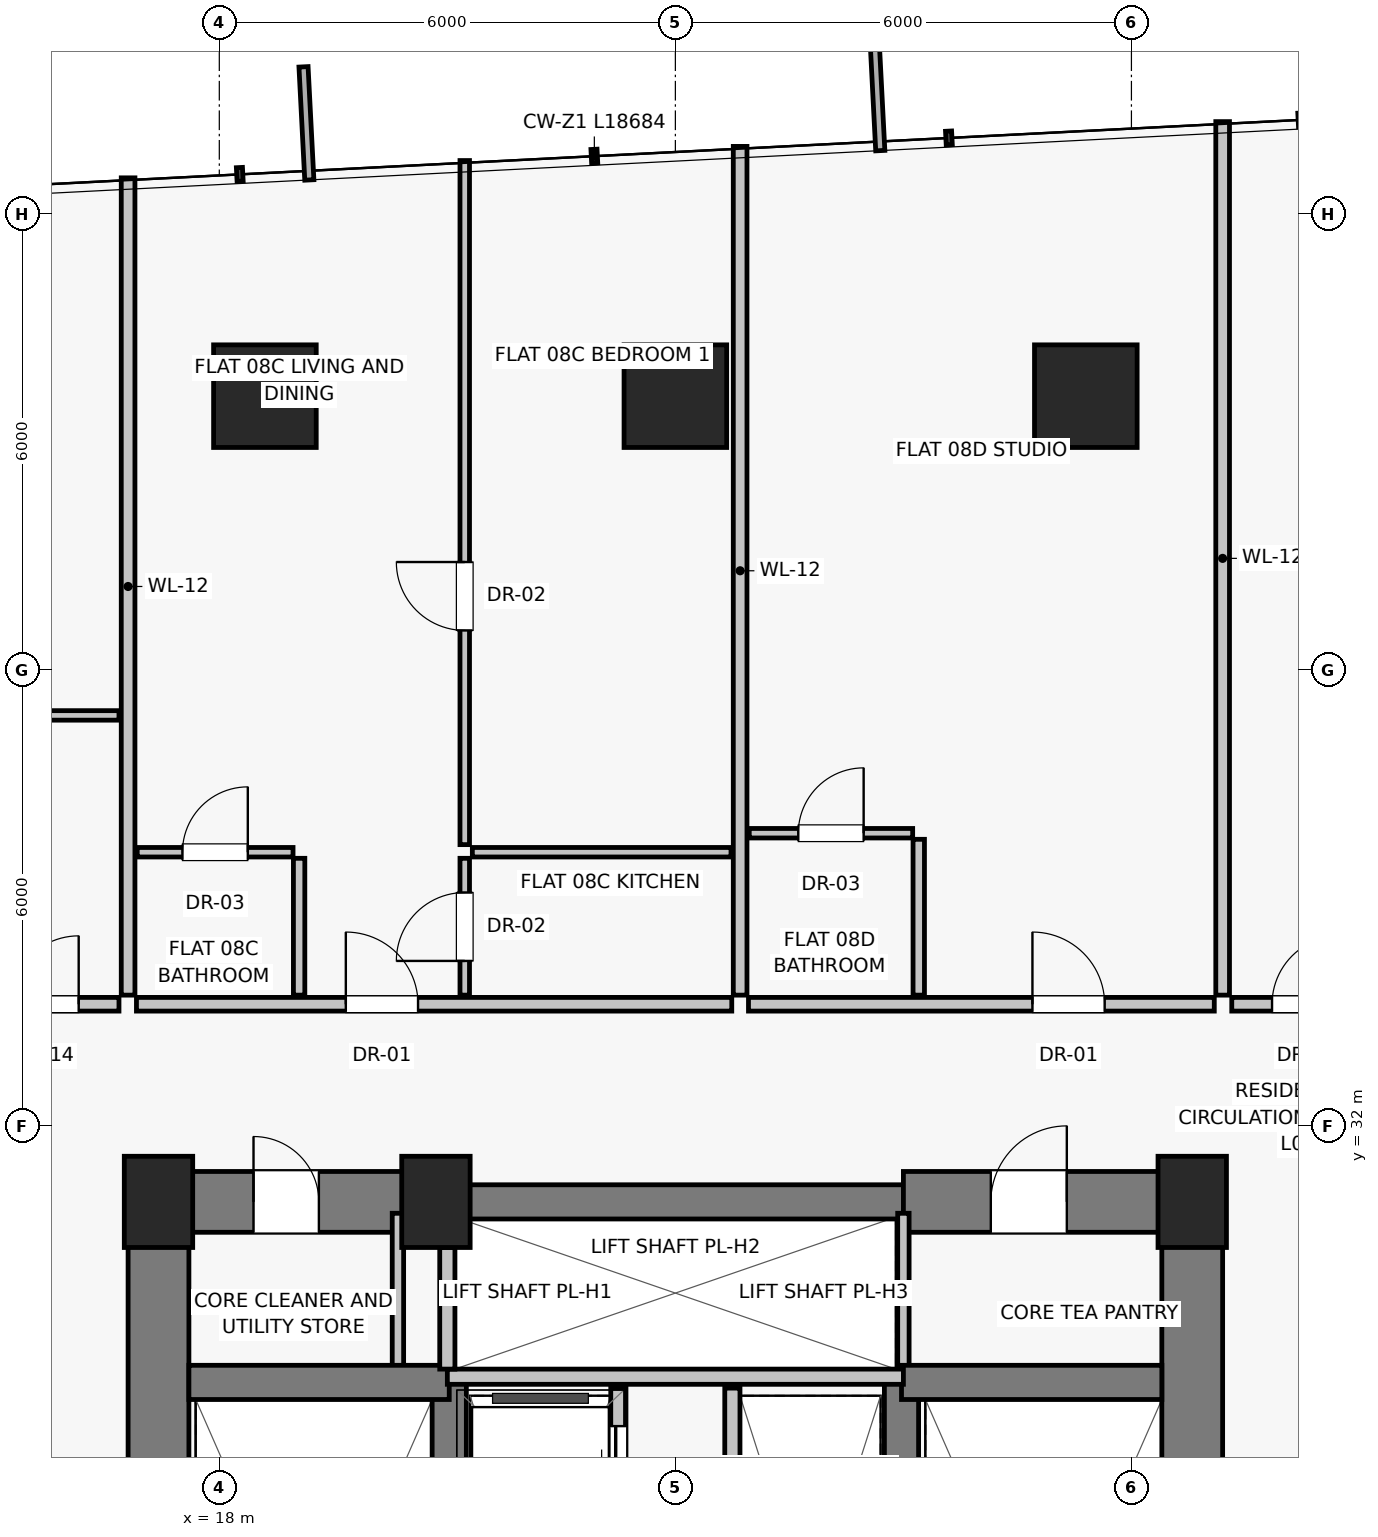
"""IFC4 building model, lengths in metres.
Left out: names, types, materials, properties, quantities, classifications, styles, units other than length and angle.
Written with IfcOpenShell. Run it as: python <this file> out.ifc"""

import sys

from ifc_helpers import new_model, si_unit, direction, frame, frame_2d, origin, origin_2d, place, context, subcontext, project, spatial, rectangle, extrude, source, transform, mapped, element, fill, save


model = new_model("IFC4")
c1 = context("Model", 3, precision=1e-05, world=origin(), true_north=direction((0.0, 1.0)))
c2 = subcontext(c1, "Body", "Model", "MODEL_VIEW")
j1 = project(units=[si_unit("LENGTHUNIT", "METRE"), si_unit("PLANEANGLEUNIT", "RADIAN")], contexts=[c1])
p1 = place(None, origin())
s1 = spatial("IfcSite", under=j1, at=p1, CompositionType="ELEMENT")
p2 = place(p1, origin())
s2 = spatial("IfcBuilding", under=s1, at=p2, CompositionType="ELEMENT")
p3 = place(p2, frame((0.0, 0.0, 33.8)))
s3 = spatial("IfcBuildingStorey", under=s2, at=p3, CompositionType="ELEMENT", Elevation=33.8)
for number, where, z_axis, x_axis in (
    (1, (17.2, 31.0, 0.0), (0.0, 0.0, 1.0), (1.0, 0.0, 0.0)),
    (2, (20.85, 31.0, 0.0), (0.0, 0.0, 1.0), (1.0, 0.0, 0.0)),
    (3, (30.8, 31.0, 0.0), (0.0, 0.0, 1.0), (1.0, 0.0, 0.0)),
):
    element("IfcColumn", number, at=place(p3, frame(where, z_axis=z_axis, x_axis=x_axis)), inside=s3, PredefinedType="PILASTER", context=c2, shape_type="SweptSolid", body=[
        extrude(rectangle(XDim=0.9, YDim=1.2, at=origin_2d()), origin(), (0.0, 0.0, 1.0), 3.25),
    ])
for number, where, z_axis, x_axis in (
    (4, (29.4, 41.6, 0.0), (0.0, 0.0, 1.0), (1.0, 0.0, 0.0)),
    (5, (24.0, 41.6, 0.0), (0.0, 0.0, 1.0), (1.0, 0.0, 0.0)),
    (6, (18.6, 41.6, 0.0), (0.0, 0.0, 1.0), (1.0, 0.0, 0.0)),
):
    element("IfcColumn", number, at=place(p3, frame(where, z_axis=z_axis, x_axis=x_axis)), inside=s3, PredefinedType="COLUMN", context=c2, shape_type="SweptSolid", body=[
        extrude(rectangle(XDim=1.35, YDim=1.35, at=origin_2d()), origin(), (0.0, 0.0, 1.0), 3.25),
    ])
for number, where, z_axis, x_axis in (
    (7, (17.2, 16.8, 0.0), (0.0, 0.0, 1.0), (0.0, 1.0, 0.0)),
    (8, (30.8, 16.8, 0.0), (0.0, 0.0, 1.0), (0.0, 1.0, 0.0)),
):
    element("IfcWall", number, at=place(p3, frame(where, z_axis=z_axis, x_axis=x_axis)), inside=s3, PredefinedType="SHEAR", context=c2, shape_type="SweptSolid", body=[
        extrude(rectangle(XDim=14.2, YDim=0.8, at=frame_2d((7.1, 0.0))), origin(), (0.0, 0.0, 1.0), 3.0),
    ])
p4 = place(p3, frame((17.2, 31.0, 0.0), z_axis=(0.0, 0.0, 1.0), x_axis=(1.0, 0.0, 0.0)))
e9 = element("IfcWall", 9, at=p4, inside=s3, PredefinedType="SHEAR", context=c2, shape_type="SweptSolid", body=[
    extrude(rectangle(XDim=3.8, YDim=0.8, at=frame_2d((1.9, 0.0))), origin(), (0.0, 0.0, 1.0), 3.0),
])
p5 = place(p4, frame((1.25, 0.0, 0.0)))
e10 = element("IfcOpeningElement", 10, at=p5, cuts=e9, PredefinedType="OPENING", context=c2, shape_type="SweptSolid", body=[
    extrude(rectangle(XDim=0.86, YDim=2.01, at=frame_2d((0.43, 1.005))), frame((0.0, 0.41, 0.0), z_axis=(0.0, -1.0, 0.0), x_axis=(1.0, 0.0, 0.0)), (0.0, 0.0, 1.0), 0.82),
])
p6 = place(p3, frame((21.0, 31.0, 0.0), z_axis=(0.0, 0.0, 1.0), x_axis=(1.0, 0.0, 0.0)))
e11 = element("IfcWall", 11, at=p6, inside=s3, PredefinedType="SHEAR", context=c2, shape_type="SweptSolid", body=[
    extrude(rectangle(XDim=6.0, YDim=0.45, at=frame_2d((3.0, 0.0))), origin(), (0.0, 0.0, 1.0), 3.0),
])
p7 = place(p3, frame((27.0, 31.0, 0.0), z_axis=(0.0, 0.0, 1.0), x_axis=(1.0, 0.0, 0.0)))
e12 = element("IfcWall", 12, at=p7, inside=s3, PredefinedType="SHEAR", context=c2, shape_type="SweptSolid", body=[
    extrude(rectangle(XDim=3.8, YDim=0.8, at=frame_2d((1.9, 0.0))), origin(), (0.0, 0.0, 1.0), 3.0),
])
p8 = place(p7, frame((1.15, 0.0, 0.0)))
e13 = element("IfcOpeningElement", 13, at=p8, cuts=e12, PredefinedType="OPENING", context=c2, shape_type="SweptSolid", body=[
    extrude(rectangle(XDim=1.0, YDim=2.01, at=frame_2d((0.5, 1.005))), frame((0.0, 0.41, 0.0), z_axis=(0.0, -1.0, 0.0), x_axis=(1.0, 0.0, 0.0)), (0.0, 0.0, 1.0), 0.82),
])
for number, where, z_axis, x_axis in (
    (14, (20.35, 28.65, 0.0), (0.0, 0.0, 1.0), (0.0, 1.0, 0.0)),
    (15, (27.0, 28.65, 0.0), (0.0, 0.0, 1.0), (0.0, 1.0, 0.0)),
):
    element("IfcWall", number, at=place(p3, frame(where, z_axis=z_axis, x_axis=x_axis)), inside=s3, PredefinedType="PARTITIONING", context=c2, shape_type="SweptSolid", body=[
        extrude(rectangle(XDim=2.2, YDim=0.15, at=frame_2d((1.1, 0.0))), origin(), (0.0, 0.0, 1.0), 3.0),
    ])
for number, where, z_axis, x_axis in (
    (16, (21.025, 19.8, 0.0), (0.0, 0.0, 1.0), (0.0, 1.0, 0.0)),
    (17, (26.975, 19.8, 0.0), (0.0, 0.0, 1.0), (0.0, 1.0, 0.0)),
):
    element("IfcWall", number, at=place(p3, frame(where, z_axis=z_axis, x_axis=x_axis)), inside=s3, PredefinedType="SHEAR", context=c2, shape_type="SweptSolid", body=[
        extrude(rectangle(XDim=8.825, YDim=0.45, at=frame_2d((4.413, 0.0))), origin(), (0.0, 0.0, 1.0), 3.0),
    ])
for number, where, z_axis, x_axis in (
    (18, (17.6, 28.625, 0.0), (0.0, 0.0, 1.0), (1.0, 0.0, 0.0)),
    (19, (26.975, 28.625, 0.0), (0.0, 0.0, 1.0), (1.0, 0.0, 0.0)),
):
    element("IfcWall", number, at=place(p3, frame(where, z_axis=z_axis, x_axis=x_axis)), inside=s3, PredefinedType="SHEAR", context=c2, shape_type="SweptSolid", body=[
        extrude(rectangle(XDim=3.425, YDim=0.45, at=frame_2d((1.712, 0.0))), origin(), (0.0, 0.0, 1.0), 3.0),
    ])
p9 = place(p3, frame((21.0, 28.7, 0.0), z_axis=(0.0, 0.0, 1.0), x_axis=(1.0, 0.0, 0.0)))
e20 = element("IfcWall", 20, at=p9, inside=s3, PredefinedType="SOLIDWALL", context=c2, shape_type="SweptSolid", body=[
    extrude(rectangle(XDim=6.0, YDim=0.2, at=frame_2d((3.0, 0.0))), origin(), (0.0, 0.0, 1.0), 3.0),
])
p10 = place(p3, frame((21.0, 28.8, 0.0), z_axis=(0.0, 0.0, 1.0), x_axis=(0.0, 1.0, 0.0)))
e21 = element("IfcWall", 21, at=p10, inside=s3, PredefinedType="SOLIDWALL", context=c2, shape_type="SweptSolid", body=[
    extrude(rectangle(XDim=1.6, YDim=0.2, at=frame_2d((0.8, 0.0))), origin(), (0.0, 0.0, 1.0), 3.0),
])
p11 = place(p3, frame((23.25, 22.6, 0.0), z_axis=(0.0, 0.0, 1.0), x_axis=(0.0, 1.0, 0.0)))
e22 = element("IfcWall", 22, at=p11, inside=s3, PredefinedType="SOLIDWALL", context=c2, shape_type="SweptSolid", body=[
    extrude(rectangle(XDim=5.95, YDim=0.2, at=frame_2d((2.975, 0.0))), origin(), (0.0, 0.0, 1.0), 3.0),
])
p12 = place(p11, frame((0.45, 0.0, 0.0)))
e23 = element("IfcOpeningElement", 23, at=p12, cuts=e22, PredefinedType="OPENING", context=c2, shape_type="SweptSolid", body=[
    extrude(rectangle(XDim=1.1, YDim=2.08, at=frame_2d((0.55, 1.04))), frame((0.0, 0.11, 0.0), z_axis=(0.0, -1.0, 0.0), x_axis=(1.0, 0.0, 0.0)), (0.0, 0.0, 1.0), 0.22),
])
p13 = place(p11, frame((2.4, 0.0, 0.0)))
e24 = element("IfcOpeningElement", 24, at=p13, cuts=e22, PredefinedType="OPENING", context=c2, shape_type="SweptSolid", body=[
    extrude(rectangle(XDim=1.1, YDim=2.08, at=frame_2d((0.55, 1.04))), frame((0.0, 0.11, 0.0), z_axis=(0.0, -1.0, 0.0), x_axis=(1.0, 0.0, 0.0)), (0.0, 0.0, 1.0), 0.22),
])
p14 = place(p11, frame((4.35, 0.0, 0.0)))
e25 = element("IfcOpeningElement", 25, at=p14, cuts=e22, PredefinedType="OPENING", context=c2, shape_type="SweptSolid", body=[
    extrude(rectangle(XDim=1.1, YDim=2.08, at=frame_2d((0.55, 1.04))), frame((0.0, 0.11, 0.0), z_axis=(0.0, -1.0, 0.0), x_axis=(1.0, 0.0, 0.0)), (0.0, 0.0, 1.0), 0.22),
])
p15 = place(p3, frame((24.75, 22.6, 0.0), z_axis=(0.0, 0.0, 1.0), x_axis=(0.0, 1.0, 0.0)))
e26 = element("IfcWall", 26, at=p15, inside=s3, PredefinedType="SOLIDWALL", context=c2, shape_type="SweptSolid", body=[
    extrude(rectangle(XDim=5.95, YDim=0.2, at=frame_2d((2.975, 0.0))), origin(), (0.0, 0.0, 1.0), 3.0),
])
p16 = place(p3, frame((16.8, 33.72, 0.0), z_axis=(0.0, 0.0, 1.0), x_axis=(0.0, 1.0, 0.0)))
e27 = element("IfcWall", 27, at=p16, inside=s3, PredefinedType="PARTITIONING", context=c2, shape_type="SweptSolid", body=[
    extrude(rectangle(XDim=10.752, YDim=0.18, at=frame_2d((5.376, 0.0))), origin(), (0.0, 0.0, 1.0), 3.0),
])
p17 = place(p3, frame((31.2, 33.72, 0.0), z_axis=(0.0, 0.0, 1.0), x_axis=(0.0, 1.0, 0.0)))
e28 = element("IfcWall", 28, at=p17, inside=s3, PredefinedType="PARTITIONING", context=c2, shape_type="SweptSolid", body=[
    extrude(rectangle(XDim=11.492, YDim=0.18, at=frame_2d((5.746, 0.0))), origin(), (0.0, 0.0, 1.0), 3.0),
])
p18 = place(p3, frame((16.91, 33.6, 0.0), z_axis=(0.0, 0.0, 1.0), x_axis=(1.0, 0.0, 0.0)))
e29 = element("IfcWall", 29, at=p18, inside=s3, PredefinedType="PARTITIONING", context=c2, shape_type="SweptSolid", body=[
    extrude(rectangle(XDim=7.832, YDim=0.18, at=frame_2d((3.916, 0.0))), origin(), (0.0, 0.0, 1.0), 3.0),
])
p19 = place(p18, frame((2.754, 0.0, 0.0)))
e30 = element("IfcOpeningElement", 30, at=p19, cuts=e29, PredefinedType="OPENING", context=c2, shape_type="SweptSolid", body=[
    extrude(rectangle(XDim=0.95, YDim=2.02, at=frame_2d((0.475, 1.01))), frame((0.0, 0.1, 0.0), z_axis=(0.0, -1.0, 0.0), x_axis=(1.0, 0.0, 0.0)), (0.0, 0.0, 1.0), 0.2),
])
p20 = place(p3, frame((19.05, 33.72, 0.0), z_axis=(0.0, 0.0, 1.0), x_axis=(0.0, 1.0, 0.0)))
e31 = element("IfcWall", 31, at=p20, inside=s3, PredefinedType="PARTITIONING", context=c2, shape_type="SweptSolid", body=[
    extrude(rectangle(XDim=1.8, YDim=0.15, at=frame_2d((0.9, 0.0))), origin(), (0.0, 0.0, 1.0), 3.0),
])
p21 = place(p3, frame((16.92, 35.6, 0.0), z_axis=(0.0, 0.0, 1.0), x_axis=(1.0, 0.0, 0.0)))
e32 = element("IfcWall", 32, at=p21, inside=s3, PredefinedType="PARTITIONING", context=c2, shape_type="SweptSolid", body=[
    extrude(rectangle(XDim=2.05, YDim=0.125, at=frame_2d((1.025, 0.0))), origin(), (0.0, 0.0, 1.0), 3.0),
])
p22 = place(p21, frame((0.595, 0.0, 0.0)))
e33 = element("IfcOpeningElement", 33, at=p22, cuts=e32, PredefinedType="OPENING", context=c2, shape_type="SweptSolid", body=[
    extrude(rectangle(XDim=0.86, YDim=2.01, at=frame_2d((0.43, 1.005))), frame((0.0, 0.073, 0.0), z_axis=(0.0, -1.0, 0.0), x_axis=(1.0, 0.0, 0.0)), (0.0, 0.0, 1.0), 0.145),
])
p23 = place(p3, frame((21.229, 33.72, 0.0), z_axis=(0.0, 0.0, 1.0), x_axis=(0.0, 1.0, 0.0)))
e34 = element("IfcWall", 34, at=p23, inside=s3, PredefinedType="PARTITIONING", context=c2, shape_type="SweptSolid", body=[
    extrude(rectangle(XDim=1.8, YDim=0.125, at=frame_2d((0.9, 0.0))), origin(), (0.0, 0.0, 1.0), 3.0),
])
p24 = place(p23, frame((0.45, 0.0, 0.0)))
e35 = element("IfcOpeningElement", 35, at=p24, cuts=e34, PredefinedType="OPENING", context=c2, shape_type="SweptSolid", body=[
    extrude(rectangle(XDim=0.9, YDim=2.01, at=frame_2d((0.45, 1.005))), frame((0.0, 0.073, 0.0), z_axis=(0.0, -1.0, 0.0), x_axis=(1.0, 0.0, 0.0)), (0.0, 0.0, 1.0), 0.145),
])
p25 = place(p3, frame((21.329, 35.6, 0.0), z_axis=(0.0, 0.0, 1.0), x_axis=(1.0, 0.0, 0.0)))
e36 = element("IfcWall", 36, at=p25, inside=s3, PredefinedType="PARTITIONING", context=c2, shape_type="SweptSolid", body=[
    extrude(rectangle(XDim=3.403, YDim=0.125, at=frame_2d((1.701, 0.0))), origin(), (0.0, 0.0, 1.0), 3.0),
])
p26 = place(p3, frame((21.229, 35.7, 0.0), z_axis=(0.0, 0.0, 1.0), x_axis=(0.0, 1.0, 0.0)))
e37 = element("IfcWall", 37, at=p26, inside=s3, PredefinedType="PARTITIONING", context=c2, shape_type="SweptSolid", body=[
    extrude(rectangle(XDim=9.0, YDim=0.125, at=frame_2d((4.5, 0.0))), origin(), (0.0, 0.0, 1.0), 3.0),
])
p27 = place(p26, frame((2.818, 0.0, 0.0)))
e38 = element("IfcOpeningElement", 38, at=p27, cuts=e37, PredefinedType="OPENING", context=c2, shape_type="SweptSolid", body=[
    extrude(rectangle(XDim=0.9, YDim=2.01, at=frame_2d((0.45, 1.005))), frame((0.0, 0.073, 0.0), z_axis=(0.0, -1.0, 0.0), x_axis=(1.0, 0.0, 0.0)), (0.0, 0.0, 1.0), 0.145),
])
p28 = place(p3, frame((24.852, 33.72, 0.0), z_axis=(0.0, 0.0, 1.0), x_axis=(0.0, 1.0, 0.0)))
e39 = element("IfcWall", 39, at=p28, inside=s3, PredefinedType="PARTITIONING", context=c2, shape_type="SweptSolid", body=[
    extrude(rectangle(XDim=11.166, YDim=0.18, at=frame_2d((5.583, 0.0))), origin(), (0.0, 0.0, 1.0), 3.0),
])
p29 = place(p3, frame((24.962, 33.6, 0.0), z_axis=(0.0, 0.0, 1.0), x_axis=(1.0, 0.0, 0.0)))
e40 = element("IfcWall", 40, at=p29, inside=s3, PredefinedType="PARTITIONING", context=c2, shape_type="SweptSolid", body=[
    extrude(rectangle(XDim=6.128, YDim=0.18, at=frame_2d((3.064, 0.0))), origin(), (0.0, 0.0, 1.0), 3.0),
])
p30 = place(p29, frame((3.736, 0.0, 0.0)))
e41 = element("IfcOpeningElement", 41, at=p30, cuts=e40, PredefinedType="OPENING", context=c2, shape_type="SweptSolid", body=[
    extrude(rectangle(XDim=0.95, YDim=2.02, at=frame_2d((0.475, 1.01))), frame((0.0, 0.1, 0.0), z_axis=(0.0, -1.0, 0.0), x_axis=(1.0, 0.0, 0.0)), (0.0, 0.0, 1.0), 0.2),
])
p31 = place(p3, frame((27.202, 33.72, 0.0), z_axis=(0.0, 0.0, 1.0), x_axis=(0.0, 1.0, 0.0)))
e42 = element("IfcWall", 42, at=p31, inside=s3, PredefinedType="PARTITIONING", context=c2, shape_type="SweptSolid", body=[
    extrude(rectangle(XDim=2.05, YDim=0.15, at=frame_2d((1.025, 0.0))), origin(), (0.0, 0.0, 1.0), 3.0),
])
p32 = place(p3, frame((24.972, 35.85, 0.0), z_axis=(0.0, 0.0, 1.0), x_axis=(1.0, 0.0, 0.0)))
e43 = element("IfcWall", 43, at=p32, inside=s3, PredefinedType="PARTITIONING", context=c2, shape_type="SweptSolid", body=[
    extrude(rectangle(XDim=2.15, YDim=0.125, at=frame_2d((1.075, 0.0))), origin(), (0.0, 0.0, 1.0), 3.0),
])
p33 = place(p32, frame((0.645, 0.0, 0.0)))
e44 = element("IfcOpeningElement", 44, at=p33, cuts=e43, PredefinedType="OPENING", context=c2, shape_type="SweptSolid", body=[
    extrude(rectangle(XDim=0.86, YDim=2.01, at=frame_2d((0.43, 1.005))), frame((0.0, 0.073, 0.0), z_axis=(0.0, -1.0, 0.0), x_axis=(1.0, 0.0, 0.0)), (0.0, 0.0, 1.0), 0.145),
])
p34 = place(p3, frame((14.72, 33.6, 0.0), z_axis=(0.0, 0.0, 1.0), x_axis=(1.0, 0.0, 0.0)))
e45 = element("IfcWall", 45, at=p34, inside=s3, PredefinedType="PARTITIONING", context=c2, shape_type="SweptSolid", body=[
    extrude(rectangle(XDim=1.96, YDim=0.18, at=frame_2d((0.98, 0.0))), origin(), (0.0, 0.0, 1.0), 3.0),
])
p35 = place(p34, frame((0.53, 0.0, 0.0)))
e46 = element("IfcOpeningElement", 46, at=p35, cuts=e45, PredefinedType="OPENING", context=c2, shape_type="SweptSolid", body=[
    extrude(rectangle(XDim=0.9, YDim=2.01, at=frame_2d((0.45, 1.005))), frame((0.0, 0.1, 0.0), z_axis=(0.0, -1.0, 0.0), x_axis=(1.0, 0.0, 0.0)), (0.0, 0.0, 1.0), 0.2),
])
p36 = place(p3, frame((7.472, 37.4, 0.0), z_axis=(0.0, 0.0, 1.0), x_axis=(1.0, 0.0, 0.0)))
e47 = element("IfcWall", 47, at=p36, inside=s3, PredefinedType="PARTITIONING", context=c2, shape_type="SweptSolid", body=[
    extrude(rectangle(XDim=9.208, YDim=0.125, at=frame_2d((4.604, 0.0))), origin(), (0.0, 0.0, 1.0), 3.0),
])
p37 = place(p36, frame((4.174, 0.0, 0.0)))
e48 = element("IfcOpeningElement", 48, at=p37, cuts=e47, PredefinedType="OPENING", context=c2, shape_type="SweptSolid", body=[
    extrude(rectangle(XDim=0.86, YDim=2.01, at=frame_2d((0.43, 1.005))), frame((0.0, 0.073, 0.0), z_axis=(0.0, -1.0, 0.0), x_axis=(1.0, 0.0, 0.0)), (0.0, 0.0, 1.0), 0.145),
])
p38 = place(p3, frame((31.32, 33.6, 0.0), z_axis=(0.0, 0.0, 1.0), x_axis=(1.0, 0.0, 0.0)))
e49 = element("IfcWall", 49, at=p38, inside=s3, PredefinedType="PARTITIONING", context=c2, shape_type="SweptSolid", body=[
    extrude(rectangle(XDim=1.96, YDim=0.18, at=frame_2d((0.98, 0.0))), origin(), (0.0, 0.0, 1.0), 3.0),
])
p39 = place(p38, frame((0.53, 0.0, 0.0)))
e50 = element("IfcOpeningElement", 50, at=p39, cuts=e49, PredefinedType="OPENING", context=c2, shape_type="SweptSolid", body=[
    extrude(rectangle(XDim=0.9, YDim=2.01, at=frame_2d((0.45, 1.005))), frame((0.0, 0.1, 0.0), z_axis=(0.0, -1.0, 0.0), x_axis=(1.0, 0.0, 0.0)), (0.0, 0.0, 1.0), 0.2),
])
m1 = source(origin(), c2, "Body", "SweptSolid", [
    extrude(rectangle(XDim=0.86, YDim=2.01, at=frame_2d((0.43, 1.005))), frame((0.0, 0.025, 0.0), z_axis=(0.0, -1.0, 0.0), x_axis=(1.0, 0.0, 0.0)), (0.0, 0.0, 1.0), 0.05),
])
p40 = place(p5, origin())
e51 = element("IfcDoor", 51, at=p40, inside=s3, OperationType="SINGLE_SWING_LEFT", PredefinedType="DOOR", context=c2, shape_type="MappedRepresentation", body=[
    mapped(m1, transform((0.0, 0.0, 0.0), scale=1.0)),
])
fill(e10, e51)
m2 = source(origin(), c2, "Body", "SweptSolid", [
    extrude(rectangle(XDim=1.0, YDim=2.01, at=frame_2d((0.5, 1.005))), frame((0.0, 0.025, 0.0), z_axis=(0.0, -1.0, 0.0), x_axis=(1.0, 0.0, 0.0)), (0.0, 0.0, 1.0), 0.05),
])
p41 = place(p8, origin())
e52 = element("IfcDoor", 52, at=p41, inside=s3, OperationType="SINGLE_SWING_RIGHT", PredefinedType="DOOR", context=c2, shape_type="MappedRepresentation", body=[
    mapped(m2, transform((0.0, 0.0, 0.0), scale=1.0)),
])
fill(e13, e52)
m3 = source(origin(), c2, "Body", "SweptSolid", [
    extrude(rectangle(XDim=1.1, YDim=2.08, at=frame_2d((0.55, 1.04))), frame((0.0, 0.025, 0.0), z_axis=(0.0, -1.0, 0.0), x_axis=(1.0, 0.0, 0.0)), (0.0, 0.0, 1.0), 0.05),
])
p42 = place(p14, origin())
e53 = element("IfcDoor", 53, at=p42, inside=s3, OperationType="SLIDING_TO_LEFT", PredefinedType="DOOR", context=c2, shape_type="MappedRepresentation", body=[
    mapped(m3, transform((0.0, 0.0, 0.0), scale=1.0)),
])
fill(e25, e53)
m4 = source(origin(), c2, "Body", "SweptSolid", [
    extrude(rectangle(XDim=0.95, YDim=2.02, at=frame_2d((0.475, 1.01))), frame((0.0, 0.025, 0.0), z_axis=(0.0, -1.0, 0.0), x_axis=(1.0, 0.0, 0.0)), (0.0, 0.0, 1.0), 0.05),
])
p43 = place(p19, origin())
e54 = element("IfcDoor", 54, at=p43, inside=s3, OperationType="SINGLE_SWING_LEFT", PredefinedType="DOOR", context=c2, shape_type="MappedRepresentation", body=[
    mapped(m4, transform((0.0, 0.0, 0.0), scale=1.0)),
])
fill(e30, e54)
p44 = place(p22, origin())
e55 = element("IfcDoor", 55, at=p44, inside=s3, OperationType="SINGLE_SWING_RIGHT", PredefinedType="DOOR", context=c2, shape_type="MappedRepresentation", body=[
    mapped(m1, transform((0.0, 0.0, 0.0), scale=1.0)),
])
fill(e33, e55)
m5 = source(origin(), c2, "Body", "SweptSolid", [
    extrude(rectangle(XDim=0.9, YDim=2.01, at=frame_2d((0.45, 1.005))), frame((0.0, 0.025, 0.0), z_axis=(0.0, -1.0, 0.0), x_axis=(1.0, 0.0, 0.0)), (0.0, 0.0, 1.0), 0.05),
])
p45 = place(p24, origin())
e56 = element("IfcDoor", 56, at=p45, inside=s3, OperationType="SINGLE_SWING_LEFT", PredefinedType="DOOR", context=c2, shape_type="MappedRepresentation", body=[
    mapped(m5, transform((0.0, 0.0, 0.0), scale=1.0)),
])
fill(e35, e56)
p46 = place(p27, origin())
e57 = element("IfcDoor", 57, at=p46, inside=s3, OperationType="SINGLE_SWING_RIGHT", PredefinedType="DOOR", context=c2, shape_type="MappedRepresentation", body=[
    mapped(m5, transform((0.0, 0.0, 0.0), scale=1.0)),
])
fill(e38, e57)
p47 = place(p30, origin())
e58 = element("IfcDoor", 58, at=p47, inside=s3, OperationType="SINGLE_SWING_LEFT", PredefinedType="DOOR", context=c2, shape_type="MappedRepresentation", body=[
    mapped(m4, transform((0.0, 0.0, 0.0), scale=1.0)),
])
fill(e41, e58)
p48 = place(p33, origin())
e59 = element("IfcDoor", 59, at=p48, inside=s3, OperationType="SINGLE_SWING_RIGHT", PredefinedType="DOOR", context=c2, shape_type="MappedRepresentation", body=[
    mapped(m1, transform((0.0, 0.0, 0.0), scale=1.0)),
])
fill(e44, e59)
p49 = place(p35, origin())
e60 = element("IfcDoor", 60, at=p49, inside=s3, OperationType="SINGLE_SWING_RIGHT", PredefinedType="DOOR", context=c2, shape_type="MappedRepresentation", body=[
    mapped(m5, transform((0.0, 0.0, 0.0), scale=1.0)),
])
fill(e46, e60)
p50 = place(p39, origin())
e61 = element("IfcDoor", 61, at=p50, inside=s3, OperationType="SINGLE_SWING_RIGHT", PredefinedType="DOOR", context=c2, shape_type="MappedRepresentation", body=[
    mapped(m5, transform((0.0, 0.0, 0.0), scale=1.0)),
])
fill(e50, e61)
save(model, sys.argv[1])
